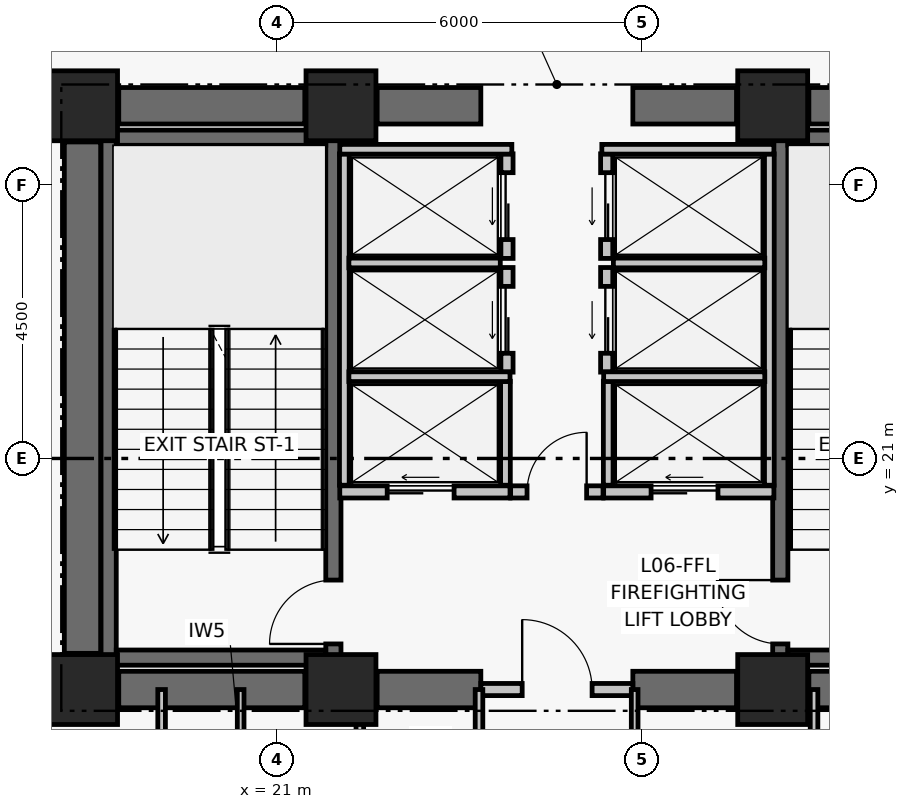
"""IFC4 building model, lengths in metres.
Left out: names, types, materials, properties, quantities, classifications, styles, units other than length and angle.
Written with IfcOpenShell. Run it as: python <this file> out.ifc"""

import sys

from ifc_helpers import new_model, si_unit, direction, frame, frame_2d, origin, origin_2d, place, context, subcontext, project, spatial, rectangle, extrude, element, fill, save


model = new_model("IFC4")
c1 = context("Model", 3, precision=1e-05, world=origin(), true_north=direction((0.0, 1.0)))
c2 = subcontext(c1, "Body", "Model", "MODEL_VIEW")
j1 = project(units=[si_unit("LENGTHUNIT", "METRE"), si_unit("PLANEANGLEUNIT", "RADIAN")], contexts=[c1])
p1 = place(None, origin())
s1 = spatial("IfcSite", under=j1, at=p1, CompositionType="ELEMENT")
p2 = place(p1, origin())
s2 = spatial("IfcBuilding", under=s1, at=p2, CompositionType="ELEMENT")
p3 = place(p2, frame((0.0, 0.0, 31.32)))
s3 = spatial("IfcBuildingStorey", under=s2, at=p3, CompositionType="ELEMENT", Elevation=31.32)
for number, where, z_axis, x_axis in (
    (1, (17.8, 17.2, 0.0), (0.0, 0.0, 1.0), (1.0, 0.0, 0.0)),
    (2, (22.05, 17.2, 0.0), (0.0, 0.0, 1.0), (1.0, 0.0, 0.0)),
    (3, (29.15, 17.2, 0.0), (0.0, 0.0, 1.0), (1.0, 0.0, 0.0)),
    (4, (17.8, 26.8, 0.0), (0.0, 0.0, 1.0), (1.0, 0.0, 0.0)),
    (5, (22.05, 26.8, 0.0), (0.0, 0.0, 1.0), (1.0, 0.0, 0.0)),
    (6, (29.15, 26.8, 0.0), (0.0, 0.0, 1.0), (1.0, 0.0, 0.0)),
):
    element("IfcColumn", number, at=place(p3, frame(where, z_axis=z_axis, x_axis=x_axis)), inside=s3, PredefinedType="COLUMN", context=c2, shape_type="SweptSolid", body=[
        extrude(rectangle(XDim=1.15, YDim=1.15, at=origin_2d()), origin(), (0.0, 0.0, 1.0), 3.72),
    ])
p4 = place(p3, frame((18.395, 17.2, 0.0), z_axis=(0.0, 0.0, 1.0), x_axis=(1.0, 0.0, 0.0)))
e7 = element("IfcWall", 7, at=p4, inside=s3, PredefinedType="SHEAR", context=c2, shape_type="SweptSolid", body=[
    extrude(rectangle(XDim=3.06, YDim=0.6, at=frame_2d((1.53, 0.0))), origin(), (0.0, 0.0, 1.0), 3.47),
])
p5 = place(p3, frame((22.645, 17.2, 0.0), z_axis=(0.0, 0.0, 1.0), x_axis=(1.0, 0.0, 0.0)))
e8 = element("IfcWall", 8, at=p5, inside=s3, PredefinedType="SHEAR", context=c2, shape_type="SweptSolid", body=[
    extrude(rectangle(XDim=1.705, YDim=0.6, at=frame_2d((0.853, 0.0))), origin(), (0.0, 0.0, 1.0), 3.47),
])
p6 = place(p3, frame((26.85, 17.2, 0.0), z_axis=(0.0, 0.0, 1.0), x_axis=(1.0, 0.0, 0.0)))
e9 = element("IfcWall", 9, at=p6, inside=s3, PredefinedType="SHEAR", context=c2, shape_type="SweptSolid", body=[
    extrude(rectangle(XDim=1.705, YDim=0.6, at=frame_2d((0.853, 0.0))), origin(), (0.0, 0.0, 1.0), 3.47),
])
p7 = place(p3, frame((29.745, 17.2, 0.0), z_axis=(0.0, 0.0, 1.0), x_axis=(1.0, 0.0, 0.0)))
e10 = element("IfcWall", 10, at=p7, inside=s3, PredefinedType="SHEAR", context=c2, shape_type="SweptSolid", body=[
    extrude(rectangle(XDim=3.06, YDim=0.6, at=frame_2d((1.53, 0.0))), origin(), (0.0, 0.0, 1.0), 3.47),
])
p8 = place(p3, frame((18.395, 26.8, 0.0), z_axis=(0.0, 0.0, 1.0), x_axis=(1.0, 0.0, 0.0)))
e11 = element("IfcWall", 11, at=p8, inside=s3, PredefinedType="SHEAR", context=c2, shape_type="SweptSolid", body=[
    extrude(rectangle(XDim=3.06, YDim=0.6, at=frame_2d((1.53, 0.0))), origin(), (0.0, 0.0, 1.0), 3.47),
])
p9 = place(p3, frame((22.645, 26.8, 0.0), z_axis=(0.0, 0.0, 1.0), x_axis=(1.0, 0.0, 0.0)))
e12 = element("IfcWall", 12, at=p9, inside=s3, PredefinedType="SHEAR", context=c2, shape_type="SweptSolid", body=[
    extrude(rectangle(XDim=1.705, YDim=0.6, at=frame_2d((0.853, 0.0))), origin(), (0.0, 0.0, 1.0), 3.47),
])
p10 = place(p3, frame((26.85, 26.8, 0.0), z_axis=(0.0, 0.0, 1.0), x_axis=(1.0, 0.0, 0.0)))
e13 = element("IfcWall", 13, at=p10, inside=s3, PredefinedType="SHEAR", context=c2, shape_type="SweptSolid", body=[
    extrude(rectangle(XDim=1.705, YDim=0.6, at=frame_2d((0.853, 0.0))), origin(), (0.0, 0.0, 1.0), 3.47),
])
p11 = place(p3, frame((29.745, 26.8, 0.0), z_axis=(0.0, 0.0, 1.0), x_axis=(1.0, 0.0, 0.0)))
e14 = element("IfcWall", 14, at=p11, inside=s3, PredefinedType="SHEAR", context=c2, shape_type="SweptSolid", body=[
    extrude(rectangle(XDim=3.06, YDim=0.6, at=frame_2d((1.53, 0.0))), origin(), (0.0, 0.0, 1.0), 3.47),
])
p12 = place(p3, frame((17.8, 17.795, 0.0), z_axis=(0.0, 0.0, 1.0), x_axis=(0.0, 1.0, 0.0)))
e15 = element("IfcWall", 15, at=p12, inside=s3, PredefinedType="SHEAR", context=c2, shape_type="SweptSolid", body=[
    extrude(rectangle(XDim=8.41, YDim=0.6, at=frame_2d((4.205, 0.0))), origin(), (0.0, 0.0, 1.0), 3.47),
])
p13 = place(p3, frame((18.229, 17.6, 0.0), z_axis=(0.0, 0.0, 1.0), x_axis=(0.0, 1.0, 0.0)))
e16 = element("IfcWall", 16, at=p13, inside=s3, PredefinedType="SHEAR", context=c2, shape_type="SweptSolid", body=[
    extrude(rectangle(XDim=8.8, YDim=0.25, at=frame_2d((4.4, 0.0))), origin(), (0.0, 0.0, 1.0), 3.47),
])
p14 = place(p3, frame((21.925, 17.6, 0.0), z_axis=(0.0, 0.0, 1.0), x_axis=(0.0, 1.0, 0.0)))
e17 = element("IfcWall", 17, at=p14, inside=s3, PredefinedType="SHEAR", context=c2, shape_type="SweptSolid", body=[
    extrude(rectangle(XDim=8.8, YDim=0.25, at=frame_2d((4.4, 0.0))), origin(), (0.0, 0.0, 1.0), 3.47),
])
p15 = place(p14, frame((0.35, 0.0, 0.0)))
e18 = element("IfcOpeningElement", 18, at=p15, cuts=e17, PredefinedType="OPENING", context=c2, shape_type="SweptSolid", body=[
    extrude(rectangle(XDim=1.05, YDim=2.08, at=frame_2d((0.525, 1.04))), frame((0.0, 0.135, 0.0), z_axis=(0.0, -1.0, 0.0), x_axis=(1.0, 0.0, 0.0)), (0.0, 0.0, 1.0), 0.27),
])
for number, where, z_axis, x_axis in (
    (19, (18.354, 17.725, 0.0), (0.0, 0.0, 1.0), (1.0, 0.0, 0.0)),
    (20, (18.354, 26.275, 0.0), (0.0, 0.0, 1.0), (1.0, 0.0, 0.0)),
):
    element("IfcWall", number, at=place(p3, frame(where, z_axis=z_axis, x_axis=x_axis)), inside=s3, PredefinedType="SHEAR", context=c2, shape_type="SweptSolid", body=[
        extrude(rectangle(XDim=3.446, YDim=0.25, at=frame_2d((1.723, 0.0))), origin(), (0.0, 0.0, 1.0), 3.47),
    ])
p16 = place(p3, frame((29.275, 17.6, 0.0), z_axis=(0.0, 0.0, 1.0), x_axis=(0.0, 1.0, 0.0)))
e21 = element("IfcWall", 21, at=p16, inside=s3, PredefinedType="SHEAR", context=c2, shape_type="SweptSolid", body=[
    extrude(rectangle(XDim=8.8, YDim=0.25, at=frame_2d((4.4, 0.0))), origin(), (0.0, 0.0, 1.0), 3.47),
])
p17 = place(p16, frame((0.35, 0.0, 0.0)))
e22 = element("IfcOpeningElement", 22, at=p17, cuts=e21, PredefinedType="OPENING", context=c2, shape_type="SweptSolid", body=[
    extrude(rectangle(XDim=1.05, YDim=2.08, at=frame_2d((0.525, 1.04))), frame((0.0, 0.135, 0.0), z_axis=(0.0, -1.0, 0.0), x_axis=(1.0, 0.0, 0.0)), (0.0, 0.0, 1.0), 0.27),
])
for number, where, z_axis, x_axis in (
    (23, (29.4, 17.725, 0.0), (0.0, 0.0, 1.0), (1.0, 0.0, 0.0)),
    (24, (29.4, 26.275, 0.0), (0.0, 0.0, 1.0), (1.0, 0.0, 0.0)),
):
    element("IfcWall", number, at=place(p3, frame(where, z_axis=z_axis, x_axis=x_axis)), inside=s3, PredefinedType="SHEAR", context=c2, shape_type="SweptSolid", body=[
        extrude(rectangle(XDim=3.446, YDim=0.25, at=frame_2d((1.723, 0.0))), origin(), (0.0, 0.0, 1.0), 3.47),
    ])
p18 = place(p3, frame((24.35, 17.2, 0.0), z_axis=(0.0, 0.0, 1.0), x_axis=(1.0, 0.0, 0.0)))
e25 = element("IfcWall", 25, at=p18, inside=s3, PredefinedType="PARTITIONING", context=c2, shape_type="SweptSolid", body=[
    extrude(rectangle(XDim=2.5, YDim=0.2, at=frame_2d((1.25, 0.0))), origin(), (0.0, 0.0, 1.0), 2.6),
])
p19 = place(p18, frame((0.68, 0.0, 0.0)))
e26 = element("IfcOpeningElement", 26, at=p19, cuts=e25, PredefinedType="OPENING", context=c2, shape_type="SweptSolid", body=[
    extrude(rectangle(XDim=1.15, YDim=2.08, at=frame_2d((0.575, 1.04))), frame((0.0, 0.11, 0.0), z_axis=(0.0, -1.0, 0.0), x_axis=(1.0, 0.0, 0.0)), (0.0, 0.0, 1.0), 0.22),
])
p20 = place(p3, frame((24.84, 20.45, 0.0), z_axis=(0.0, 0.0, 1.0), x_axis=(1.0, 0.0, 0.0)))
e27 = element("IfcWall", 27, at=p20, inside=s3, PredefinedType="PARTITIONING", context=c2, shape_type="SweptSolid", body=[
    extrude(rectangle(XDim=1.52, YDim=0.2, at=frame_2d((0.76, 0.0))), origin(), (0.0, 0.0, 1.0), 3.47),
])
p21 = place(p20, frame((0.27, 0.0, 0.0)))
e28 = element("IfcOpeningElement", 28, at=p21, cuts=e27, PredefinedType="OPENING", context=c2, shape_type="SweptSolid", body=[
    extrude(rectangle(XDim=0.98, YDim=2.06, at=frame_2d((0.49, 1.03))), frame((0.0, 0.11, 0.0), z_axis=(0.0, -1.0, 0.0), x_axis=(1.0, 0.0, 0.0)), (0.0, 0.0, 1.0), 0.22),
])
p22 = place(p3, frame((22.03, 20.45, 0.0), z_axis=(0.0, 0.0, 1.0), x_axis=(1.0, 0.0, 0.0)))
e29 = element("IfcWall", 29, at=p22, inside=s3, PredefinedType="PARTITIONING", context=c2, shape_type="SweptSolid", body=[
    extrude(rectangle(XDim=2.8, YDim=0.2, at=frame_2d((1.4, 0.0))), origin(), (0.0, 0.0, 1.0), 3.47),
])
p23 = place(p22, frame((0.78, 0.0, 0.0)))
e30 = element("IfcOpeningElement", 30, at=p23, cuts=e29, PredefinedType="OPENING", context=c2, shape_type="SweptSolid", body=[
    extrude(rectangle(XDim=1.1, YDim=2.08, at=frame_2d((0.55, 1.04))), frame((0.0, 0.11, 0.0), z_axis=(0.0, -1.0, 0.0), x_axis=(1.0, 0.0, 0.0)), (0.0, 0.0, 1.0), 0.22),
])
p24 = place(p3, frame((26.37, 20.45, 0.0), z_axis=(0.0, 0.0, 1.0), x_axis=(1.0, 0.0, 0.0)))
e31 = element("IfcWall", 31, at=p24, inside=s3, PredefinedType="PARTITIONING", context=c2, shape_type="SweptSolid", body=[
    extrude(rectangle(XDim=2.8, YDim=0.2, at=frame_2d((1.4, 0.0))), origin(), (0.0, 0.0, 1.0), 3.47),
])
p25 = place(p24, frame((0.78, 0.0, 0.0)))
e32 = element("IfcOpeningElement", 32, at=p25, cuts=e31, PredefinedType="OPENING", context=c2, shape_type="SweptSolid", body=[
    extrude(rectangle(XDim=1.1, YDim=2.08, at=frame_2d((0.55, 1.04))), frame((0.0, 0.11, 0.0), z_axis=(0.0, -1.0, 0.0), x_axis=(1.0, 0.0, 0.0)), (0.0, 0.0, 1.0), 0.22),
])
p26 = place(p3, frame((24.78, 22.42, 0.0), z_axis=(0.0, 0.0, 1.0), x_axis=(0.0, 1.0, 0.0)))
e33 = element("IfcWall", 33, at=p26, inside=s3, PredefinedType="PARTITIONING", context=c2, shape_type="SweptSolid", body=[
    extrude(rectangle(XDim=1.72, YDim=0.2, at=frame_2d((0.86, 0.0))), origin(), (0.0, 0.0, 1.0), 3.47),
])
p27 = place(p26, frame((0.31, 0.0, 0.0)))
e34 = element("IfcOpeningElement", 34, at=p27, cuts=e33, PredefinedType="OPENING", context=c2, shape_type="SweptSolid", body=[
    extrude(rectangle(XDim=1.1, YDim=2.08, at=frame_2d((0.55, 1.04))), frame((0.0, 0.11, 0.0), z_axis=(0.0, -1.0, 0.0), x_axis=(1.0, 0.0, 0.0)), (0.0, 0.0, 1.0), 0.22),
])
p28 = place(p3, frame((24.78, 24.29, 0.0), z_axis=(0.0, 0.0, 1.0), x_axis=(0.0, 1.0, 0.0)))
e35 = element("IfcWall", 35, at=p28, inside=s3, PredefinedType="PARTITIONING", context=c2, shape_type="SweptSolid", body=[
    extrude(rectangle(XDim=1.72, YDim=0.2, at=frame_2d((0.86, 0.0))), origin(), (0.0, 0.0, 1.0), 3.47),
])
p29 = place(p28, frame((0.31, 0.0, 0.0)))
e36 = element("IfcOpeningElement", 36, at=p29, cuts=e35, PredefinedType="OPENING", context=c2, shape_type="SweptSolid", body=[
    extrude(rectangle(XDim=1.1, YDim=2.08, at=frame_2d((0.55, 1.04))), frame((0.0, 0.11, 0.0), z_axis=(0.0, -1.0, 0.0), x_axis=(1.0, 0.0, 0.0)), (0.0, 0.0, 1.0), 0.22),
])
p30 = place(p3, frame((26.42, 22.42, 0.0), z_axis=(0.0, 0.0, 1.0), x_axis=(0.0, 1.0, 0.0)))
e37 = element("IfcWall", 37, at=p30, inside=s3, PredefinedType="PARTITIONING", context=c2, shape_type="SweptSolid", body=[
    extrude(rectangle(XDim=1.72, YDim=0.2, at=frame_2d((0.86, 0.0))), origin(), (0.0, 0.0, 1.0), 3.47),
])
p31 = place(p30, frame((0.31, 0.0, 0.0)))
e38 = element("IfcOpeningElement", 38, at=p31, cuts=e37, PredefinedType="OPENING", context=c2, shape_type="SweptSolid", body=[
    extrude(rectangle(XDim=1.1, YDim=2.08, at=frame_2d((0.55, 1.04))), frame((0.0, 0.11, 0.0), z_axis=(0.0, -1.0, 0.0), x_axis=(1.0, 0.0, 0.0)), (0.0, 0.0, 1.0), 0.22),
])
p32 = place(p3, frame((26.42, 24.29, 0.0), z_axis=(0.0, 0.0, 1.0), x_axis=(0.0, 1.0, 0.0)))
e39 = element("IfcWall", 39, at=p32, inside=s3, PredefinedType="PARTITIONING", context=c2, shape_type="SweptSolid", body=[
    extrude(rectangle(XDim=1.72, YDim=0.2, at=frame_2d((0.86, 0.0))), origin(), (0.0, 0.0, 1.0), 3.47),
])
p33 = place(p32, frame((0.31, 0.0, 0.0)))
e40 = element("IfcOpeningElement", 40, at=p33, cuts=e39, PredefinedType="OPENING", context=c2, shape_type="SweptSolid", body=[
    extrude(rectangle(XDim=1.1, YDim=2.08, at=frame_2d((0.55, 1.04))), frame((0.0, 0.11, 0.0), z_axis=(0.0, -1.0, 0.0), x_axis=(1.0, 0.0, 0.0)), (0.0, 0.0, 1.0), 0.22),
])
p34 = place(p3, frame((22.105, 20.56, 0.0), z_axis=(0.0, 0.0, 1.0), x_axis=(0.0, 1.0, 0.0)))
e41 = element("IfcWall", 41, at=p34, inside=s3, PredefinedType="PARTITIONING", context=c2, shape_type="SweptSolid", body=[
    extrude(rectangle(XDim=5.45, YDim=0.16, at=frame_2d((2.725, 0.0))), origin(), (0.0, 0.0, 1.0), 3.47),
])
p35 = place(p3, frame((24.755, 20.56, 0.0), z_axis=(0.0, 0.0, 1.0), x_axis=(0.0, 1.0, 0.0)))
e42 = element("IfcWall", 42, at=p35, inside=s3, PredefinedType="PARTITIONING", context=c2, shape_type="SweptSolid", body=[
    extrude(rectangle(XDim=1.71, YDim=0.16, at=frame_2d((0.855, 0.0))), origin(), (0.0, 0.0, 1.0), 3.47),
])
p36 = place(p3, frame((22.18, 22.345, 0.0), z_axis=(0.0, 0.0, 1.0), x_axis=(1.0, 0.0, 0.0)))
e43 = element("IfcWall", 43, at=p36, inside=s3, PredefinedType="PARTITIONING", context=c2, shape_type="SweptSolid", body=[
    extrude(rectangle(XDim=2.65, YDim=0.16, at=frame_2d((1.325, 0.0))), origin(), (0.0, 0.0, 1.0), 3.47),
])
p37 = place(p3, frame((22.18, 24.215, 0.0), z_axis=(0.0, 0.0, 1.0), x_axis=(1.0, 0.0, 0.0)))
e44 = element("IfcWall", 44, at=p37, inside=s3, PredefinedType="PARTITIONING", context=c2, shape_type="SweptSolid", body=[
    extrude(rectangle(XDim=2.49, YDim=0.16, at=frame_2d((1.245, 0.0))), origin(), (0.0, 0.0, 1.0), 3.47),
])
p38 = place(p3, frame((22.03, 26.085, 0.0), z_axis=(0.0, 0.0, 1.0), x_axis=(1.0, 0.0, 0.0)))
e45 = element("IfcWall", 45, at=p38, inside=s3, PredefinedType="PARTITIONING", context=c2, shape_type="SweptSolid", body=[
    extrude(rectangle(XDim=2.83, YDim=0.16, at=frame_2d((1.415, 0.0))), origin(), (0.0, 0.0, 1.0), 3.47),
])
p39 = place(p3, frame((29.095, 20.56, 0.0), z_axis=(0.0, 0.0, 1.0), x_axis=(0.0, 1.0, 0.0)))
e46 = element("IfcWall", 46, at=p39, inside=s3, PredefinedType="PARTITIONING", context=c2, shape_type="SweptSolid", body=[
    extrude(rectangle(XDim=5.45, YDim=0.16, at=frame_2d((2.725, 0.0))), origin(), (0.0, 0.0, 1.0), 3.47),
])
p40 = place(p3, frame((26.445, 20.56, 0.0), z_axis=(0.0, 0.0, 1.0), x_axis=(0.0, 1.0, 0.0)))
e47 = element("IfcWall", 47, at=p40, inside=s3, PredefinedType="PARTITIONING", context=c2, shape_type="SweptSolid", body=[
    extrude(rectangle(XDim=1.71, YDim=0.16, at=frame_2d((0.855, 0.0))), origin(), (0.0, 0.0, 1.0), 3.47),
])
p41 = place(p3, frame((26.37, 22.345, 0.0), z_axis=(0.0, 0.0, 1.0), x_axis=(1.0, 0.0, 0.0)))
e48 = element("IfcWall", 48, at=p41, inside=s3, PredefinedType="PARTITIONING", context=c2, shape_type="SweptSolid", body=[
    extrude(rectangle(XDim=2.65, YDim=0.16, at=frame_2d((1.325, 0.0))), origin(), (0.0, 0.0, 1.0), 3.47),
])
p42 = place(p3, frame((26.53, 24.215, 0.0), z_axis=(0.0, 0.0, 1.0), x_axis=(1.0, 0.0, 0.0)))
e49 = element("IfcWall", 49, at=p42, inside=s3, PredefinedType="PARTITIONING", context=c2, shape_type="SweptSolid", body=[
    extrude(rectangle(XDim=2.49, YDim=0.16, at=frame_2d((1.245, 0.0))), origin(), (0.0, 0.0, 1.0), 3.47),
])
p43 = place(p3, frame((26.34, 26.085, 0.0), z_axis=(0.0, 0.0, 1.0), x_axis=(1.0, 0.0, 0.0)))
e50 = element("IfcWall", 50, at=p43, inside=s3, PredefinedType="PARTITIONING", context=c2, shape_type="SweptSolid", body=[
    extrude(rectangle(XDim=2.83, YDim=0.16, at=frame_2d((1.415, 0.0))), origin(), (0.0, 0.0, 1.0), 3.47),
])
p44 = place(p3, frame((19.1, 14.95, 0.0), z_axis=(0.0, 0.0, 1.0), x_axis=(0.0, 1.0, 0.0)))
e51 = element("IfcWall", 51, at=p44, inside=s3, PredefinedType="PARTITIONING", context=c2, shape_type="SweptSolid", body=[
    extrude(rectangle(XDim=2.25, YDim=0.125, at=frame_2d((1.125, 0.0))), origin(), (0.0, 0.0, 1.0), 2.6),
])
p45 = place(p3, frame((20.4, 14.95, 0.0), z_axis=(0.0, 0.0, 1.0), x_axis=(0.0, 1.0, 0.0)))
e52 = element("IfcWall", 52, at=p45, inside=s3, PredefinedType="PARTITIONING", context=c2, shape_type="SweptSolid", body=[
    extrude(rectangle(XDim=2.25, YDim=0.11, at=frame_2d((1.125, 0.0))), origin(), (0.0, 0.0, 1.0), 2.6),
])
for number, where, z_axis, x_axis in (
    (53, (22.36, 14.95, 0.0), (0.0, 0.0, 1.0), (0.0, 1.0, 0.0)),
    (54, (24.32, 14.95, 0.0), (0.0, 0.0, 1.0), (0.0, 1.0, 0.0)),
):
    element("IfcWall", number, at=place(p3, frame(where, z_axis=z_axis, x_axis=x_axis)), inside=s3, PredefinedType="PARTITIONING", context=c2, shape_type="SweptSolid", body=[
        extrude(rectangle(XDim=2.25, YDim=0.125, at=frame_2d((1.125, 0.0))), origin(), (0.0, 0.0, 1.0), 2.6),
    ])
p46 = place(p3, frame((26.88, 14.95, 0.0), z_axis=(0.0, 0.0, 1.0), x_axis=(0.0, 1.0, 0.0)))
e55 = element("IfcWall", 55, at=p46, inside=s3, PredefinedType="PARTITIONING", context=c2, shape_type="SweptSolid", body=[
    extrude(rectangle(XDim=2.25, YDim=0.11, at=frame_2d((1.125, 0.0))), origin(), (0.0, 0.0, 1.0), 2.6),
])
p47 = place(p3, frame((29.83, 14.95, 0.0), z_axis=(0.0, 0.0, 1.0), x_axis=(0.0, 1.0, 0.0)))
e56 = element("IfcWall", 56, at=p47, inside=s3, PredefinedType="PARTITIONING", context=c2, shape_type="SweptSolid", body=[
    extrude(rectangle(XDim=2.25, YDim=0.125, at=frame_2d((1.125, 0.0))), origin(), (0.0, 0.0, 1.0), 2.6),
])
p48 = place(p15, origin())
e57 = element("IfcDoor", 57, at=p48, inside=s3, OperationType="SINGLE_SWING_LEFT", PredefinedType="DOOR", context=c2, shape_type="SweptSolid", body=[
    extrude(rectangle(XDim=1.05, YDim=2.08, at=frame_2d((0.525, 1.04))), frame((0.0, 0.025, 0.0), z_axis=(0.0, -1.0, 0.0), x_axis=(1.0, 0.0, 0.0)), (0.0, 0.0, 1.0), 0.05),
])
fill(e18, e57)
p49 = place(p17, origin())
e58 = element("IfcDoor", 58, at=p49, inside=s3, OperationType="SINGLE_SWING_RIGHT", PredefinedType="DOOR", context=c2, shape_type="SweptSolid", body=[
    extrude(rectangle(XDim=1.05, YDim=2.08, at=frame_2d((0.525, 1.04))), frame((0.0, 0.025, 0.0), z_axis=(0.0, -1.0, 0.0), x_axis=(1.0, 0.0, 0.0)), (0.0, 0.0, 1.0), 0.05),
])
fill(e22, e58)
p50 = place(p19, origin())
e59 = element("IfcDoor", 59, at=p50, inside=s3, OperationType="SINGLE_SWING_LEFT", PredefinedType="DOOR", context=c2, shape_type="SweptSolid", body=[
    extrude(rectangle(XDim=1.15, YDim=2.08, at=frame_2d((0.575, 1.04))), frame((0.0, 0.025, 0.0), z_axis=(0.0, -1.0, 0.0), x_axis=(1.0, 0.0, 0.0)), (0.0, 0.0, 1.0), 0.05),
])
fill(e26, e59)
p51 = place(p21, origin())
e60 = element("IfcDoor", 60, at=p51, inside=s3, OperationType="SINGLE_SWING_RIGHT", PredefinedType="DOOR", context=c2, shape_type="SweptSolid", body=[
    extrude(rectangle(XDim=0.98, YDim=2.06, at=frame_2d((0.49, 1.03))), frame((0.0, 0.025, 0.0), z_axis=(0.0, -1.0, 0.0), x_axis=(1.0, 0.0, 0.0)), (0.0, 0.0, 1.0), 0.05),
])
fill(e28, e60)
p52 = place(p23, origin())
e61 = element("IfcDoor", 61, at=p52, inside=s3, OperationType="DOUBLE_DOOR_SLIDING", PredefinedType="DOOR", context=c2, shape_type="SweptSolid", body=[
    extrude(rectangle(XDim=1.1, YDim=2.08, at=frame_2d((0.55, 1.04))), frame((0.0, 0.025, 0.0), z_axis=(0.0, -1.0, 0.0), x_axis=(1.0, 0.0, 0.0)), (0.0, 0.0, 1.0), 0.05),
])
fill(e30, e61)
p53 = place(p25, origin())
e62 = element("IfcDoor", 62, at=p53, inside=s3, OperationType="DOUBLE_DOOR_SLIDING", PredefinedType="DOOR", context=c2, shape_type="SweptSolid", body=[
    extrude(rectangle(XDim=1.1, YDim=2.08, at=frame_2d((0.55, 1.04))), frame((0.0, 0.025, 0.0), z_axis=(0.0, -1.0, 0.0), x_axis=(1.0, 0.0, 0.0)), (0.0, 0.0, 1.0), 0.05),
])
fill(e32, e62)
p54 = place(p27, origin())
e63 = element("IfcDoor", 63, at=p54, inside=s3, OperationType="DOUBLE_DOOR_SLIDING", PredefinedType="DOOR", context=c2, shape_type="SweptSolid", body=[
    extrude(rectangle(XDim=1.1, YDim=2.08, at=frame_2d((0.55, 1.04))), frame((0.0, 0.025, 0.0), z_axis=(0.0, -1.0, 0.0), x_axis=(1.0, 0.0, 0.0)), (0.0, 0.0, 1.0), 0.05),
])
fill(e34, e63)
p55 = place(p29, origin())
e64 = element("IfcDoor", 64, at=p55, inside=s3, OperationType="DOUBLE_DOOR_SLIDING", PredefinedType="DOOR", context=c2, shape_type="SweptSolid", body=[
    extrude(rectangle(XDim=1.1, YDim=2.08, at=frame_2d((0.55, 1.04))), frame((0.0, 0.025, 0.0), z_axis=(0.0, -1.0, 0.0), x_axis=(1.0, 0.0, 0.0)), (0.0, 0.0, 1.0), 0.05),
])
fill(e36, e64)
p56 = place(p31, origin())
e65 = element("IfcDoor", 65, at=p56, inside=s3, OperationType="DOUBLE_DOOR_SLIDING", PredefinedType="DOOR", context=c2, shape_type="SweptSolid", body=[
    extrude(rectangle(XDim=1.1, YDim=2.08, at=frame_2d((0.55, 1.04))), frame((0.0, 0.025, 0.0), z_axis=(0.0, -1.0, 0.0), x_axis=(1.0, 0.0, 0.0)), (0.0, 0.0, 1.0), 0.05),
])
fill(e38, e65)
p57 = place(p33, origin())
e66 = element("IfcDoor", 66, at=p57, inside=s3, OperationType="DOUBLE_DOOR_SLIDING", PredefinedType="DOOR", context=c2, shape_type="SweptSolid", body=[
    extrude(rectangle(XDim=1.1, YDim=2.08, at=frame_2d((0.55, 1.04))), frame((0.0, 0.025, 0.0), z_axis=(0.0, -1.0, 0.0), x_axis=(1.0, 0.0, 0.0)), (0.0, 0.0, 1.0), 0.05),
])
fill(e40, e66)
save(model, sys.argv[1])
